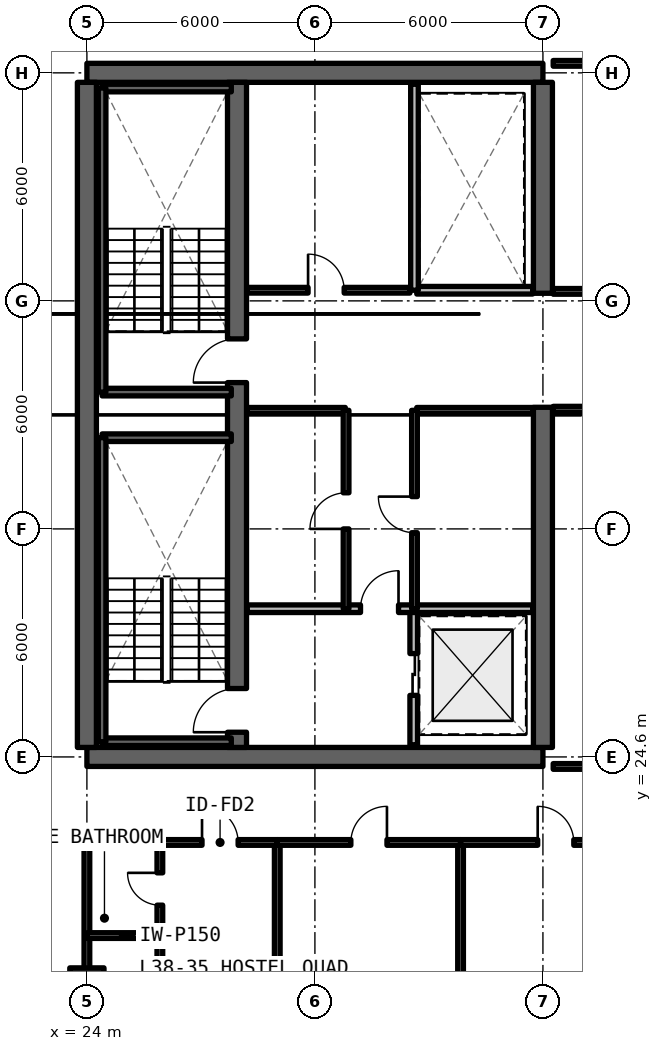
"""IFC4 building model, lengths in metres.
Left out: names, types, materials, properties, quantities, classifications, styles, units other than length and angle.
Written with IfcOpenShell. Run it as: python <this file> out.ifc"""

import sys

from ifc_helpers import new_model, si_unit, direction, frame, frame_2d, origin, origin_2d, place, context, subcontext, project, spatial, rectangle, extrude, element, fill, save


model = new_model("IFC4")
c1 = context("Model", 3, precision=1e-05, world=origin(), true_north=direction((0.0, 1.0)))
c2 = subcontext(c1, "Body", "Model", "MODEL_VIEW")
j1 = project(units=[si_unit("LENGTHUNIT", "METRE"), si_unit("PLANEANGLEUNIT", "RADIAN")], contexts=[c1])
p1 = place(None, origin())
s1 = spatial("IfcSite", under=j1, at=p1, CompositionType="ELEMENT")
p2 = place(p1, origin())
s2 = spatial("IfcBuilding", under=s1, at=p2, CompositionType="ELEMENT")
p3 = place(p2, frame((0.0, 0.0, 138.6)))
s3 = spatial("IfcBuildingStorey", under=s2, at=p3, CompositionType="ELEMENT", Elevation=138.6)
for number, where, z_axis, x_axis in (
    (1, (24.0, 24.6, 0.0), (0.0, 0.0, 1.0), (1.0, 0.0, 0.0)),
    (2, (36.0, 42.6, 0.0), (0.0, 0.0, 1.0), (-1.0, 0.0, 0.0)),
):
    element("IfcWall", number, at=place(p3, frame(where, z_axis=z_axis, x_axis=x_axis)), inside=s3, PredefinedType="SHEAR", context=c2, shape_type="SweptSolid", body=[
        extrude(rectangle(XDim=12.0, YDim=0.5, at=frame_2d((6.0, 0.0))), origin(), (0.0, 0.0, 1.0), 3.3),
    ])
p4 = place(p3, frame((24.0, 24.85, 0.0), z_axis=(0.0, 0.0, 1.0), x_axis=(0.0, 1.0, 0.0)))
e3 = element("IfcWall", 3, at=p4, inside=s3, PredefinedType="SHEAR", context=c2, shape_type="SweptSolid", body=[
    extrude(rectangle(XDim=17.5, YDim=0.5, at=frame_2d((8.75, 0.0))), origin(), (0.0, 0.0, 1.0), 3.3),
])
p5 = place(p3, frame((36.0, 24.85, 0.0), z_axis=(0.0, 0.0, 1.0), x_axis=(0.0, 1.0, 0.0)))
e4 = element("IfcWall", 4, at=p5, inside=s3, PredefinedType="SHEAR", context=c2, shape_type="SweptSolid", body=[
    extrude(rectangle(XDim=8.95, YDim=0.5, at=frame_2d((4.475, 0.0))), origin(), (0.0, 0.0, 1.0), 3.3),
])
p6 = place(p3, frame((36.0, 36.8, 0.0), z_axis=(0.0, 0.0, 1.0), x_axis=(0.0, 1.0, 0.0)))
e5 = element("IfcWall", 5, at=p6, inside=s3, PredefinedType="SHEAR", context=c2, shape_type="SweptSolid", body=[
    extrude(rectangle(XDim=5.55, YDim=0.5, at=frame_2d((2.775, 0.0))), origin(), (0.0, 0.0, 1.0), 3.3),
])
p7 = place(p3, frame((27.95, 24.85, 0.0), z_axis=(0.0, 0.0, 1.0), x_axis=(0.0, 1.0, 0.0)))
e6 = element("IfcWall", 6, at=p7, inside=s3, PredefinedType="SHEAR", context=c2, shape_type="SweptSolid", body=[
    extrude(rectangle(XDim=17.5, YDim=0.5, at=frame_2d((8.75, 0.0))), origin(), (0.0, 0.0, 1.0), 3.3),
])
p8 = place(p7, frame((0.4, 0.0, 0.0)))
e7 = element("IfcOpeningElement", 7, at=p8, cuts=e6, PredefinedType="OPENING", context=c2, shape_type="SweptSolid", body=[
    extrude(rectangle(XDim=1.15, YDim=2.15, at=frame_2d((0.575, 1.075))), frame((0.0, 0.26, 0.0), z_axis=(0.0, -1.0, 0.0), x_axis=(1.0, 0.0, 0.0)), (0.0, 0.0, 1.0), 0.52),
])
p9 = place(p7, frame((9.6, 0.0, 0.0)))
e8 = element("IfcOpeningElement", 8, at=p9, cuts=e6, PredefinedType="OPENING", context=c2, shape_type="SweptSolid", body=[
    extrude(rectangle(XDim=1.15, YDim=2.15, at=frame_2d((0.575, 1.075))), frame((0.0, 0.26, 0.0), z_axis=(0.0, -1.0, 0.0), x_axis=(1.0, 0.0, 0.0)), (0.0, 0.0, 1.0), 0.52),
])
p10 = place(p3, frame((24.0, 18.6, 0.0), z_axis=(0.0, 0.0, 1.0), x_axis=(1.0, 0.0, 0.0)))
e9 = element("IfcColumn", 9, at=p10, inside=s3, PredefinedType="COLUMN", context=c2, shape_type="SweptSolid", body=[
    extrude(rectangle(XDim=0.9, YDim=0.9, at=origin_2d()), origin(), (0.0, 0.0, 1.0), 3.3),
])
p11 = place(p3, frame((32.6, 24.92, 0.0), z_axis=(0.0, 0.0, 1.0), x_axis=(0.0, 1.0, 0.0)))
e10 = element("IfcWall", 10, at=p11, inside=s3, PredefinedType="SOLIDWALL", context=c2, shape_type="SweptSolid", body=[
    extrude(rectangle(XDim=3.58, YDim=0.2, at=frame_2d((1.79, 0.0))), origin(), (0.0, 0.0, 1.0), 2.35),
])
p12 = place(p11, frame((1.3, 0.0, 0.0)))
e11 = element("IfcOpeningElement", 11, at=p12, cuts=e10, PredefinedType="OPENING", context=c2, shape_type="SweptSolid", body=[
    extrude(rectangle(XDim=1.1, YDim=2.2, at=frame_2d((0.55, 1.1))), frame((0.0, 0.11, 0.0), z_axis=(0.0, -1.0, 0.0), x_axis=(1.0, 0.0, 0.0)), (0.0, 0.0, 1.0), 0.22),
])
p13 = place(p3, frame((28.22, 28.5, 0.0), z_axis=(0.0, 0.0, 1.0), x_axis=(1.0, 0.0, 0.0)))
e12 = element("IfcWall", 12, at=p13, inside=s3, PredefinedType="SOLIDWALL", context=c2, shape_type="SweptSolid", body=[
    extrude(rectangle(XDim=7.51, YDim=0.2, at=frame_2d((3.755, 0.0))), origin(), (0.0, 0.0, 1.0), 2.35),
])
p14 = place(p13, frame((2.98, 0.0, 0.0)))
e13 = element("IfcOpeningElement", 13, at=p14, cuts=e12, PredefinedType="OPENING", context=c2, shape_type="SweptSolid", body=[
    extrude(rectangle(XDim=1.0, YDim=2.15, at=frame_2d((0.5, 1.075))), frame((0.0, 0.11, 0.0), z_axis=(0.0, -1.0, 0.0), x_axis=(1.0, 0.0, 0.0)), (0.0, 0.0, 1.0), 0.22),
])
p15 = place(p3, frame((28.22, 33.72, 0.0), z_axis=(0.0, 0.0, 1.0), x_axis=(1.0, 0.0, 0.0)))
e14 = element("IfcWall", 14, at=p15, inside=s3, PredefinedType="SOLIDWALL", context=c2, shape_type="SweptSolid", body=[
    extrude(rectangle(XDim=2.58, YDim=0.15, at=frame_2d((1.29, 0.0))), origin(), (0.0, 0.0, 1.0), 2.35),
])
p16 = place(p3, frame((30.82, 28.5, 0.0), z_axis=(0.0, 0.0, 1.0), x_axis=(0.0, 1.0, 0.0)))
e15 = element("IfcWall", 15, at=p16, inside=s3, PredefinedType="SOLIDWALL", context=c2, shape_type="SweptSolid", body=[
    extrude(rectangle(XDim=5.22, YDim=0.15, at=frame_2d((2.61, 0.0))), origin(), (0.0, 0.0, 1.0), 2.35),
])
p17 = place(p16, frame((2.1, 0.0, 0.0)))
e16 = element("IfcOpeningElement", 16, at=p17, cuts=e15, PredefinedType="OPENING", context=c2, shape_type="SweptSolid", body=[
    extrude(rectangle(XDim=0.95, YDim=2.15, at=frame_2d((0.475, 1.075))), frame((0.0, 0.085, 0.0), z_axis=(0.0, -1.0, 0.0), x_axis=(1.0, 0.0, 0.0)), (0.0, 0.0, 1.0), 0.17),
])
p18 = place(p3, frame((32.68, 33.72, 0.0), z_axis=(0.0, 0.0, 1.0), x_axis=(1.0, 0.0, 0.0)))
e17 = element("IfcWall", 17, at=p18, inside=s3, PredefinedType="SOLIDWALL", context=c2, shape_type="SweptSolid", body=[
    extrude(rectangle(XDim=3.05, YDim=0.15, at=frame_2d((1.525, 0.0))), origin(), (0.0, 0.0, 1.0), 2.35),
])
p19 = place(p3, frame((32.62, 28.5, 0.0), z_axis=(0.0, 0.0, 1.0), x_axis=(0.0, 1.0, 0.0)))
e18 = element("IfcWall", 18, at=p19, inside=s3, PredefinedType="SOLIDWALL", context=c2, shape_type="SweptSolid", body=[
    extrude(rectangle(XDim=5.22, YDim=0.15, at=frame_2d((2.61, 0.0))), origin(), (0.0, 0.0, 1.0), 2.35),
])
p20 = place(p19, frame((2.0, 0.0, 0.0)))
e19 = element("IfcOpeningElement", 19, at=p20, cuts=e18, PredefinedType="OPENING", context=c2, shape_type="SweptSolid", body=[
    extrude(rectangle(XDim=0.95, YDim=2.15, at=frame_2d((0.475, 1.075))), frame((0.0, 0.085, 0.0), z_axis=(0.0, -1.0, 0.0), x_axis=(1.0, 0.0, 0.0)), (0.0, 0.0, 1.0), 0.17),
])
p21 = place(p3, frame((28.22, 36.88, 0.0), z_axis=(0.0, 0.0, 1.0), x_axis=(1.0, 0.0, 0.0)))
e20 = element("IfcWall", 20, at=p21, inside=s3, PredefinedType="SOLIDWALL", context=c2, shape_type="SweptSolid", body=[
    extrude(rectangle(XDim=4.28, YDim=0.15, at=frame_2d((2.14, 0.0))), origin(), (0.0, 0.0, 1.0), 2.35),
])
p22 = place(p21, frame((1.6, 0.0, 0.0)))
e21 = element("IfcOpeningElement", 21, at=p22, cuts=e20, PredefinedType="OPENING", context=c2, shape_type="SweptSolid", body=[
    extrude(rectangle(XDim=0.95, YDim=2.15, at=frame_2d((0.475, 1.075))), frame((0.0, 0.085, 0.0), z_axis=(0.0, -1.0, 0.0), x_axis=(1.0, 0.0, 0.0)), (0.0, 0.0, 1.0), 0.17),
])
p23 = place(p3, frame((32.68, 36.88, 0.0), z_axis=(0.0, 0.0, 1.0), x_axis=(1.0, 0.0, 0.0)))
e22 = element("IfcWall", 22, at=p23, inside=s3, PredefinedType="SOLIDWALL", context=c2, shape_type="SweptSolid", body=[
    extrude(rectangle(XDim=3.05, YDim=0.2, at=frame_2d((1.525, 0.0))), origin(), (0.0, 0.0, 1.0), 2.35),
])
p24 = place(p3, frame((32.62, 36.88, 0.0), z_axis=(0.0, 0.0, 1.0), x_axis=(0.0, 1.0, 0.0)))
e23 = element("IfcWall", 23, at=p24, inside=s3, PredefinedType="SOLIDWALL", context=c2, shape_type="SweptSolid", body=[
    extrude(rectangle(XDim=5.42, YDim=0.2, at=frame_2d((2.71, 0.0))), origin(), (0.0, 0.0, 1.0), 2.35),
])
p25 = place(p3, frame((36.27, 24.35, 0.0), z_axis=(0.0, 0.0, 1.0), x_axis=(1.0, 0.0, 0.0)))
e24 = element("IfcWall", 24, at=p25, inside=s3, PredefinedType="SOLIDWALL", context=c2, shape_type="SweptSolid", body=[
    extrude(rectangle(XDim=7.88, YDim=0.15, at=frame_2d((3.94, 0.0))), origin(), (0.0, 0.0, 1.0), 2.35),
])
p26 = place(p3, frame((36.27, 33.75, 0.0), z_axis=(0.0, 0.0, 1.0), x_axis=(1.0, 0.0, 0.0)))
e25 = element("IfcWall", 25, at=p26, inside=s3, PredefinedType="SOLIDWALL", context=c2, shape_type="SweptSolid", body=[
    extrude(rectangle(XDim=7.88, YDim=0.15, at=frame_2d((3.94, 0.0))), origin(), (0.0, 0.0, 1.0), 2.35),
])
p27 = place(p26, frame((3.465, 0.0, 0.0)))
e26 = element("IfcOpeningElement", 26, at=p27, cuts=e25, PredefinedType="OPENING", context=c2, shape_type="SweptSolid", body=[
    extrude(rectangle(XDim=0.95, YDim=2.15, at=frame_2d((0.475, 1.075))), frame((0.0, 0.085, 0.0), z_axis=(0.0, -1.0, 0.0), x_axis=(1.0, 0.0, 0.0)), (0.0, 0.0, 1.0), 0.17),
])
p28 = place(p3, frame((36.27, 36.85, 0.0), z_axis=(0.0, 0.0, 1.0), x_axis=(1.0, 0.0, 0.0)))
e27 = element("IfcWall", 27, at=p28, inside=s3, PredefinedType="SOLIDWALL", context=c2, shape_type="SweptSolid", body=[
    extrude(rectangle(XDim=7.88, YDim=0.15, at=frame_2d((3.94, 0.0))), origin(), (0.0, 0.0, 1.0), 2.35),
])
p29 = place(p28, frame((3.465, 0.0, 0.0)))
e28 = element("IfcOpeningElement", 28, at=p29, cuts=e27, PredefinedType="OPENING", context=c2, shape_type="SweptSolid", body=[
    extrude(rectangle(XDim=0.95, YDim=2.15, at=frame_2d((0.475, 1.075))), frame((0.0, 0.085, 0.0), z_axis=(0.0, -1.0, 0.0), x_axis=(1.0, 0.0, 0.0)), (0.0, 0.0, 1.0), 0.17),
])
p30 = place(p3, frame((36.27, 42.85, 0.0), z_axis=(0.0, 0.0, 1.0), x_axis=(1.0, 0.0, 0.0)))
e29 = element("IfcWall", 29, at=p30, inside=s3, PredefinedType="SOLIDWALL", context=c2, shape_type="SweptSolid", body=[
    extrude(rectangle(XDim=7.88, YDim=0.15, at=frame_2d((3.94, 0.0))), origin(), (0.0, 0.0, 1.0), 2.35),
])
for number, where, z_axis, x_axis in (
    (30, (24.0, 12.15, 0.0), (0.0, 0.0, 1.0), (0.0, 1.0, 0.0)),
    (31, (29.009, 12.15, 0.0), (0.0, 0.0, 1.0), (0.0, 1.0, 0.0)),
):
    element("IfcWall", number, at=place(p3, frame(where, z_axis=z_axis, x_axis=x_axis)), inside=s3, PredefinedType="SOLIDWALL", context=c2, shape_type="SweptSolid", body=[
        extrude(rectangle(XDim=10.2, YDim=0.15, at=frame_2d((5.1, 0.0))), origin(), (0.0, 0.0, 1.0), 2.35),
    ])
p31 = place(p3, frame((24.0, 19.9, 0.0), z_axis=(0.0, 0.0, 1.0), x_axis=(1.0, 0.0, 0.0)))
e32 = element("IfcWall", 32, at=p31, inside=s3, PredefinedType="PARTITIONING", context=c2, shape_type="SweptSolid", body=[
    extrude(rectangle(XDim=1.92, YDim=0.15, at=frame_2d((0.96, 0.0))), origin(), (0.0, 0.0, 1.0), 2.35),
])
p32 = place(p3, frame((25.92, 12.15, 0.0), z_axis=(0.0, 0.0, 1.0), x_axis=(0.0, 1.0, 0.0)))
e33 = element("IfcWall", 33, at=p32, inside=s3, PredefinedType="PARTITIONING", context=c2, shape_type="SweptSolid", body=[
    extrude(rectangle(XDim=10.2, YDim=0.15, at=frame_2d((5.1, 0.0))), origin(), (0.0, 0.0, 1.0), 2.35),
])
p33 = place(p32, frame((2.96, 0.0, 0.0)))
e34 = element("IfcOpeningElement", 34, at=p33, cuts=e33, PredefinedType="OPENING", context=c2, shape_type="SweptSolid", body=[
    extrude(rectangle(XDim=0.85, YDim=2.1, at=frame_2d((0.425, 1.05))), frame((0.0, 0.085, 0.0), z_axis=(0.0, -1.0, 0.0), x_axis=(1.0, 0.0, 0.0)), (0.0, 0.0, 1.0), 0.17),
])
p34 = place(p32, frame((8.55, 0.0, 0.0)))
e35 = element("IfcOpeningElement", 35, at=p34, cuts=e33, PredefinedType="OPENING", context=c2, shape_type="SweptSolid", body=[
    extrude(rectangle(XDim=0.85, YDim=2.1, at=frame_2d((0.425, 1.05))), frame((0.0, 0.085, 0.0), z_axis=(0.0, -1.0, 0.0), x_axis=(1.0, 0.0, 0.0)), (0.0, 0.0, 1.0), 0.17),
])
p35 = place(p3, frame((24.0, 22.35, 0.0), z_axis=(0.0, 0.0, 1.0), x_axis=(1.0, 0.0, 0.0)))
e36 = element("IfcWall", 36, at=p35, inside=s3, PredefinedType="SOLIDWALL", context=c2, shape_type="SweptSolid", body=[
    extrude(rectangle(XDim=5.009, YDim=0.15, at=frame_2d((2.504, 0.0))), origin(), (0.0, 0.0, 1.0), 2.35),
])
p36 = place(p35, frame((3.03, 0.0, 0.0)))
e37 = element("IfcOpeningElement", 37, at=p36, cuts=e36, PredefinedType="OPENING", context=c2, shape_type="SweptSolid", body=[
    extrude(rectangle(XDim=0.95, YDim=2.15, at=frame_2d((0.475, 1.075))), frame((0.0, 0.085, 0.0), z_axis=(0.0, -1.0, 0.0), x_axis=(1.0, 0.0, 0.0)), (0.0, 0.0, 1.0), 0.17),
])
p37 = place(p3, frame((33.833, 12.15, 0.0), z_axis=(0.0, 0.0, 1.0), x_axis=(0.0, 1.0, 0.0)))
e38 = element("IfcWall", 38, at=p37, inside=s3, PredefinedType="SOLIDWALL", context=c2, shape_type="SweptSolid", body=[
    extrude(rectangle(XDim=10.2, YDim=0.15, at=frame_2d((5.1, 0.0))), origin(), (0.0, 0.0, 1.0), 2.35),
])
p38 = place(p3, frame((29.009, 22.35, 0.0), z_axis=(0.0, 0.0, 1.0), x_axis=(1.0, 0.0, 0.0)))
e39 = element("IfcWall", 39, at=p38, inside=s3, PredefinedType="SOLIDWALL", context=c2, shape_type="SweptSolid", body=[
    extrude(rectangle(XDim=4.824, YDim=0.15, at=frame_2d((2.412, 0.0))), origin(), (0.0, 0.0, 1.0), 2.35),
])
p39 = place(p38, frame((1.937, 0.0, 0.0)))
e40 = element("IfcOpeningElement", 40, at=p39, cuts=e39, PredefinedType="OPENING", context=c2, shape_type="SweptSolid", body=[
    extrude(rectangle(XDim=0.95, YDim=2.15, at=frame_2d((0.475, 1.075))), frame((0.0, 0.085, 0.0), z_axis=(0.0, -1.0, 0.0), x_axis=(1.0, 0.0, 0.0)), (0.0, 0.0, 1.0), 0.17),
])
p40 = place(p3, frame((33.833, 22.35, 0.0), z_axis=(0.0, 0.0, 1.0), x_axis=(1.0, 0.0, 0.0)))
e41 = element("IfcWall", 41, at=p40, inside=s3, PredefinedType="SOLIDWALL", context=c2, shape_type="SweptSolid", body=[
    extrude(rectangle(XDim=5.009, YDim=0.15, at=frame_2d((2.504, 0.0))), origin(), (0.0, 0.0, 1.0), 2.35),
])
p41 = place(p40, frame((2.03, 0.0, 0.0)))
e42 = element("IfcOpeningElement", 42, at=p41, cuts=e41, PredefinedType="OPENING", context=c2, shape_type="SweptSolid", body=[
    extrude(rectangle(XDim=0.95, YDim=2.15, at=frame_2d((0.475, 1.075))), frame((0.0, 0.085, 0.0), z_axis=(0.0, -1.0, 0.0), x_axis=(1.0, 0.0, 0.0)), (0.0, 0.0, 1.0), 0.17),
])
for number, where, z_axis, x_axis in (
    (43, (24.4, 25.0, 0.0), (0.0, 0.0, 1.0), (1.0, 0.0, 0.0)),
    (44, (27.8, 33.0, 0.0), (0.0, 0.0, 1.0), (-1.0, 0.0, 0.0)),
):
    element("IfcWall", number, at=place(p3, frame(where, z_axis=z_axis, x_axis=x_axis)), inside=s3, PredefinedType="SOLIDWALL", context=c2, shape_type="SweptSolid", body=[
        extrude(rectangle(XDim=3.4, YDim=0.2, at=frame_2d((1.7, 0.0))), origin(), (0.0, 0.0, 1.0), 3.3),
    ])
p42 = place(p3, frame((24.4, 33.0, 0.0), z_axis=(0.0, 0.0, 1.0), x_axis=(0.0, -1.0, 0.0)))
e45 = element("IfcWall", 45, at=p42, inside=s3, PredefinedType="SOLIDWALL", context=c2, shape_type="SweptSolid", body=[
    extrude(rectangle(XDim=8.0, YDim=0.2, at=frame_2d((4.0, 0.0))), origin(), (0.0, 0.0, 1.0), 3.3),
])
for number, where, z_axis, x_axis in (
    (46, (24.4, 34.2, 0.0), (0.0, 0.0, 1.0), (1.0, 0.0, 0.0)),
    (47, (27.8, 42.2, 0.0), (0.0, 0.0, 1.0), (-1.0, 0.0, 0.0)),
):
    element("IfcWall", number, at=place(p3, frame(where, z_axis=z_axis, x_axis=x_axis)), inside=s3, PredefinedType="SOLIDWALL", context=c2, shape_type="SweptSolid", body=[
        extrude(rectangle(XDim=3.4, YDim=0.2, at=frame_2d((1.7, 0.0))), origin(), (0.0, 0.0, 1.0), 3.3),
    ])
p43 = place(p3, frame((24.4, 42.2, 0.0), z_axis=(0.0, 0.0, 1.0), x_axis=(0.0, -1.0, 0.0)))
e48 = element("IfcWall", 48, at=p43, inside=s3, PredefinedType="SOLIDWALL", context=c2, shape_type="SweptSolid", body=[
    extrude(rectangle(XDim=8.0, YDim=0.2, at=frame_2d((4.0, 0.0))), origin(), (0.0, 0.0, 1.0), 3.3),
])
p44 = place(p12, origin())
e49 = element("IfcDoor", 49, at=p44, inside=s3, OperationType="SLIDING_TO_LEFT", PredefinedType="DOOR", context=c2, shape_type="SweptSolid", body=[
    extrude(rectangle(XDim=1.1, YDim=2.2, at=frame_2d((0.55, 1.1))), frame((0.0, 0.025, 0.0), z_axis=(0.0, -1.0, 0.0), x_axis=(1.0, 0.0, 0.0)), (0.0, 0.0, 1.0), 0.05),
])
fill(e11, e49)
p45 = place(p14, origin())
e50 = element("IfcDoor", 50, at=p45, inside=s3, OperationType="SINGLE_SWING_RIGHT", PredefinedType="DOOR", context=c2, shape_type="SweptSolid", body=[
    extrude(rectangle(XDim=1.0, YDim=2.15, at=frame_2d((0.5, 1.075))), frame((0.0, 0.025, 0.0), z_axis=(0.0, -1.0, 0.0), x_axis=(1.0, 0.0, 0.0)), (0.0, 0.0, 1.0), 0.05),
])
fill(e13, e50)
p46 = place(p17, origin())
e51 = element("IfcDoor", 51, at=p46, inside=s3, OperationType="SINGLE_SWING_LEFT", PredefinedType="DOOR", context=c2, shape_type="SweptSolid", body=[
    extrude(rectangle(XDim=0.95, YDim=2.15, at=frame_2d((0.475, 1.075))), frame((0.0, 0.025, 0.0), z_axis=(0.0, -1.0, 0.0), x_axis=(1.0, 0.0, 0.0)), (0.0, 0.0, 1.0), 0.05),
])
fill(e16, e51)
p47 = place(p20, origin())
e52 = element("IfcDoor", 52, at=p47, inside=s3, OperationType="SINGLE_SWING_RIGHT", PredefinedType="DOOR", context=c2, shape_type="SweptSolid", body=[
    extrude(rectangle(XDim=0.95, YDim=2.15, at=frame_2d((0.475, 1.075))), frame((0.0, 0.025, 0.0), z_axis=(0.0, -1.0, 0.0), x_axis=(1.0, 0.0, 0.0)), (0.0, 0.0, 1.0), 0.05),
])
fill(e19, e52)
p48 = place(p22, origin())
e53 = element("IfcDoor", 53, at=p48, inside=s3, OperationType="SINGLE_SWING_LEFT", PredefinedType="DOOR", context=c2, shape_type="SweptSolid", body=[
    extrude(rectangle(XDim=0.95, YDim=2.15, at=frame_2d((0.475, 1.075))), frame((0.0, 0.025, 0.0), z_axis=(0.0, -1.0, 0.0), x_axis=(1.0, 0.0, 0.0)), (0.0, 0.0, 1.0), 0.05),
])
fill(e21, e53)
p49 = place(p34, origin())
e54 = element("IfcDoor", 54, at=p49, inside=s3, OperationType="SINGLE_SWING_RIGHT", PredefinedType="DOOR", context=c2, shape_type="SweptSolid", body=[
    extrude(rectangle(XDim=0.85, YDim=2.1, at=frame_2d((0.425, 1.05))), frame((0.0, 0.025, 0.0), z_axis=(0.0, -1.0, 0.0), x_axis=(1.0, 0.0, 0.0)), (0.0, 0.0, 1.0), 0.05),
])
fill(e35, e54)
p50 = place(p36, origin())
e55 = element("IfcDoor", 55, at=p50, inside=s3, OperationType="SINGLE_SWING_LEFT", PredefinedType="DOOR", context=c2, shape_type="SweptSolid", body=[
    extrude(rectangle(XDim=0.95, YDim=2.15, at=frame_2d((0.475, 1.075))), frame((0.0, 0.025, 0.0), z_axis=(0.0, -1.0, 0.0), x_axis=(1.0, 0.0, 0.0)), (0.0, 0.0, 1.0), 0.05),
])
fill(e37, e55)
p51 = place(p39, origin())
e56 = element("IfcDoor", 56, at=p51, inside=s3, OperationType="SINGLE_SWING_RIGHT", PredefinedType="DOOR", context=c2, shape_type="SweptSolid", body=[
    extrude(rectangle(XDim=0.95, YDim=2.15, at=frame_2d((0.475, 1.075))), frame((0.0, 0.025, 0.0), z_axis=(0.0, -1.0, 0.0), x_axis=(1.0, 0.0, 0.0)), (0.0, 0.0, 1.0), 0.05),
])
fill(e40, e56)
p52 = place(p41, origin())
e57 = element("IfcDoor", 57, at=p52, inside=s3, OperationType="SINGLE_SWING_LEFT", PredefinedType="DOOR", context=c2, shape_type="SweptSolid", body=[
    extrude(rectangle(XDim=0.95, YDim=2.15, at=frame_2d((0.475, 1.075))), frame((0.0, 0.025, 0.0), z_axis=(0.0, -1.0, 0.0), x_axis=(1.0, 0.0, 0.0)), (0.0, 0.0, 1.0), 0.05),
])
fill(e42, e57)
p53 = place(p8, origin())
e58 = element("IfcDoor", 58, at=p53, inside=s3, OperationType="SINGLE_SWING_RIGHT", PredefinedType="DOOR", context=c2, shape_type="SweptSolid", body=[
    extrude(rectangle(XDim=1.15, YDim=2.15, at=frame_2d((0.575, 1.075))), frame((0.0, 0.025, 0.0), z_axis=(0.0, -1.0, 0.0), x_axis=(1.0, 0.0, 0.0)), (0.0, 0.0, 1.0), 0.05),
])
fill(e7, e58)
p54 = place(p9, origin())
e59 = element("IfcDoor", 59, at=p54, inside=s3, OperationType="SINGLE_SWING_LEFT", PredefinedType="DOOR", context=c2, shape_type="SweptSolid", body=[
    extrude(rectangle(XDim=1.15, YDim=2.15, at=frame_2d((0.575, 1.075))), frame((0.0, 0.025, 0.0), z_axis=(0.0, -1.0, 0.0), x_axis=(1.0, 0.0, 0.0)), (0.0, 0.0, 1.0), 0.05),
])
fill(e8, e59)
save(model, sys.argv[1])
